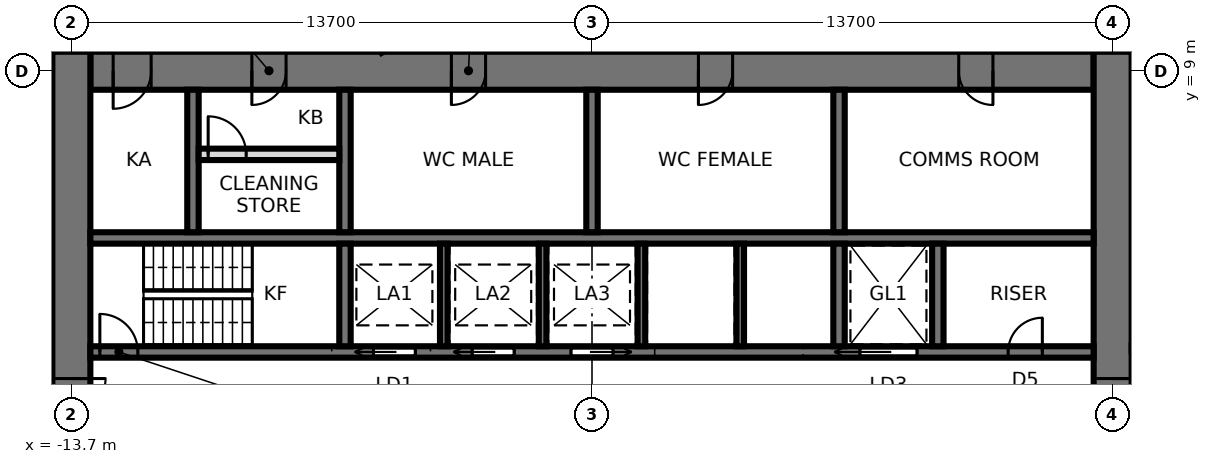
"""IFC4 building model, lengths in metres.
Left out: names, types, materials, properties, quantities, classifications, styles, units other than length and angle.
Written with IfcOpenShell. Run it as: python <this file> out.ifc"""

import sys

from ifc_helpers import new_model, si_unit, direction, frame, frame_2d, origin, place, context, subcontext, project, spatial, rectangle, extrude, element, fill, save


model = new_model("IFC4")
c1 = context("Model", 3, precision=1e-05, world=origin(), true_north=direction((0.0, 1.0)))
c2 = subcontext(c1, "Body", "Model", "MODEL_VIEW")
j1 = project(units=[si_unit("LENGTHUNIT", "METRE"), si_unit("PLANEANGLEUNIT", "RADIAN")], contexts=[c1])
p1 = place(None, origin())
s1 = spatial("IfcSite", under=j1, at=p1, CompositionType="ELEMENT")
p2 = place(p1, origin())
s2 = spatial("IfcBuilding", under=s1, at=p2, CompositionType="ELEMENT")
p3 = place(p2, frame((0.0, 0.0, 23.8)))
s3 = spatial("IfcBuildingStorey", under=s2, at=p3, CompositionType="ELEMENT", Elevation=23.8)
p4 = place(p3, frame((13.2, 9.0, 0.0), z_axis=(0.0, 0.0, 1.0), x_axis=(-1.0, 0.0, 0.0)))
e1 = element("IfcWall", 1, at=p4, inside=s3, PredefinedType="SHEAR", context=c2, shape_type="SweptSolid", body=[
    extrude(rectangle(XDim=26.4, YDim=1.0, at=frame_2d((13.2, 0.0))), origin(), (0.0, 0.0, 1.0), 4.2),
])
p5 = place(p4, frame((2.65, 0.0, 0.0)))
e2 = element("IfcOpeningElement", 2, at=p5, cuts=e1, PredefinedType="OPENING", context=c2, shape_type="SweptSolid", body=[
    extrude(rectangle(XDim=0.9, YDim=2.1, at=frame_2d((0.45, 1.05))), frame((0.0, 0.51, 0.0), z_axis=(0.0, -1.0, 0.0), x_axis=(1.0, 0.0, 0.0)), (0.0, 0.0, 1.0), 1.02),
])
p6 = place(p4, frame((9.5, 0.0, 0.0)))
e3 = element("IfcOpeningElement", 3, at=p6, cuts=e1, PredefinedType="OPENING", context=c2, shape_type="SweptSolid", body=[
    extrude(rectangle(XDim=0.9, YDim=2.1, at=frame_2d((0.45, 1.05))), frame((0.0, 0.51, 0.0), z_axis=(0.0, -1.0, 0.0), x_axis=(1.0, 0.0, 0.0)), (0.0, 0.0, 1.0), 1.02),
])
p7 = place(p4, frame((16.0, 0.0, 0.0)))
e4 = element("IfcOpeningElement", 4, at=p7, cuts=e1, PredefinedType="OPENING", context=c2, shape_type="SweptSolid", body=[
    extrude(rectangle(XDim=0.9, YDim=2.1, at=frame_2d((0.45, 1.05))), frame((0.0, 0.51, 0.0), z_axis=(0.0, -1.0, 0.0), x_axis=(1.0, 0.0, 0.0)), (0.0, 0.0, 1.0), 1.02),
])
p8 = place(p4, frame((21.25, 0.0, 0.0)))
e5 = element("IfcOpeningElement", 5, at=p8, cuts=e1, PredefinedType="OPENING", context=c2, shape_type="SweptSolid", body=[
    extrude(rectangle(XDim=0.9, YDim=2.1, at=frame_2d((0.45, 1.05))), frame((0.0, 0.51, 0.0), z_axis=(0.0, -1.0, 0.0), x_axis=(1.0, 0.0, 0.0)), (0.0, 0.0, 1.0), 1.02),
])
p9 = place(p4, frame((24.8, 0.0, 0.0)))
e6 = element("IfcOpeningElement", 6, at=p9, cuts=e1, PredefinedType="OPENING", context=c2, shape_type="SweptSolid", body=[
    extrude(rectangle(XDim=1.0, YDim=2.1, at=frame_2d((0.5, 1.05))), frame((0.0, 0.51, 0.0), z_axis=(0.0, -1.0, 0.0), x_axis=(1.0, 0.0, 0.0)), (0.0, 0.0, 1.0), 1.02),
])
p10 = place(p3, frame((13.7, -9.5, 0.0), z_axis=(0.0, 0.0, 1.0), x_axis=(0.0, 1.0, 0.0)))
e7 = element("IfcWall", 7, at=p10, inside=s3, PredefinedType="SHEAR", context=c2, shape_type="SweptSolid", body=[
    extrude(rectangle(XDim=19.0, YDim=1.0, at=frame_2d((9.5, 0.0))), origin(), (0.0, 0.0, 1.0), 4.2),
])
p11 = place(p10, frame((8.6, 0.0, 0.0)))
e8 = element("IfcOpeningElement", 8, at=p11, cuts=e7, PredefinedType="OPENING", context=c2, shape_type="SweptSolid", body=[
    extrude(rectangle(XDim=1.8, YDim=2.4, at=frame_2d((0.9, 1.2))), frame((0.0, 0.51, 0.0), z_axis=(0.0, -1.0, 0.0), x_axis=(1.0, 0.0, 0.0)), (0.0, 0.0, 1.0), 1.02),
])
p12 = place(p3, frame((-13.7, 9.5, 0.0), z_axis=(0.0, 0.0, 1.0), x_axis=(0.0, -1.0, 0.0)))
e9 = element("IfcWall", 9, at=p12, inside=s3, PredefinedType="SHEAR", context=c2, shape_type="SweptSolid", body=[
    extrude(rectangle(XDim=19.0, YDim=1.0, at=frame_2d((9.5, 0.0))), origin(), (0.0, 0.0, 1.0), 4.2),
])
p13 = place(p12, frame((8.6, 0.0, 0.0)))
e10 = element("IfcOpeningElement", 10, at=p13, cuts=e9, PredefinedType="OPENING", context=c2, shape_type="SweptSolid", body=[
    extrude(rectangle(XDim=1.8, YDim=2.4, at=frame_2d((0.9, 1.2))), frame((0.0, 0.51, 0.0), z_axis=(0.0, -1.0, 0.0), x_axis=(1.0, 0.0, 0.0)), (0.0, 0.0, 1.0), 1.02),
])
p14 = place(p3, frame((-13.2, 1.6, 0.0), z_axis=(0.0, 0.0, 1.0), x_axis=(1.0, 0.0, 0.0)))
e11 = element("IfcWall", 11, at=p14, inside=s3, PredefinedType="SHEAR", context=c2, shape_type="SweptSolid", body=[
    extrude(rectangle(XDim=26.4, YDim=0.3, at=frame_2d((13.2, 0.0))), origin(), (0.0, 0.0, 1.0), 4.2),
])
p15 = place(p14, frame((0.25, 0.0, 0.0)))
e12 = element("IfcOpeningElement", 12, at=p15, cuts=e11, PredefinedType="OPENING", context=c2, shape_type="SweptSolid", body=[
    extrude(rectangle(XDim=1.0, YDim=2.1, at=frame_2d((0.5, 1.05))), frame((0.0, 0.16, 0.0), z_axis=(0.0, -1.0, 0.0), x_axis=(1.0, 0.0, 0.0)), (0.0, 0.0, 1.0), 0.32),
])
p16 = place(p14, frame((20.25, 0.0, 0.0)))
e13 = element("IfcOpeningElement", 13, at=p16, cuts=e11, PredefinedType="OPENING", context=c2, shape_type="SweptSolid", body=[
    extrude(rectangle(XDim=1.5, YDim=2.4, at=frame_2d((0.75, 1.2))), frame((0.0, 0.16, 0.0), z_axis=(0.0, -1.0, 0.0), x_axis=(1.0, 0.0, 0.0)), (0.0, 0.0, 1.0), 0.32),
])
p17 = place(p14, frame((7.45, 0.0, 0.0)))
e14 = element("IfcOpeningElement", 14, at=p17, cuts=e11, PredefinedType="OPENING", context=c2, shape_type="SweptSolid", body=[
    extrude(rectangle(XDim=1.1, YDim=2.3, at=frame_2d((0.55, 1.15))), frame((0.0, 0.16, 0.0), z_axis=(0.0, -1.0, 0.0), x_axis=(1.0, 0.0, 0.0)), (0.0, 0.0, 1.0), 0.32),
])
p18 = place(p14, frame((10.05, 0.0, 0.0)))
e15 = element("IfcOpeningElement", 15, at=p18, cuts=e11, PredefinedType="OPENING", context=c2, shape_type="SweptSolid", body=[
    extrude(rectangle(XDim=1.1, YDim=2.3, at=frame_2d((0.55, 1.15))), frame((0.0, 0.16, 0.0), z_axis=(0.0, -1.0, 0.0), x_axis=(1.0, 0.0, 0.0)), (0.0, 0.0, 1.0), 0.32),
])
p19 = place(p14, frame((12.65, 0.0, 0.0)))
e16 = element("IfcOpeningElement", 16, at=p19, cuts=e11, PredefinedType="OPENING", context=c2, shape_type="SweptSolid", body=[
    extrude(rectangle(XDim=1.1, YDim=2.3, at=frame_2d((0.55, 1.15))), frame((0.0, 0.16, 0.0), z_axis=(0.0, -1.0, 0.0), x_axis=(1.0, 0.0, 0.0)), (0.0, 0.0, 1.0), 0.32),
])
p20 = place(p14, frame((24.15, 0.0, 0.0)))
e17 = element("IfcOpeningElement", 17, at=p20, cuts=e11, PredefinedType="OPENING", context=c2, shape_type="SweptSolid", body=[
    extrude(rectangle(XDim=0.9, YDim=2.1, at=frame_2d((0.45, 1.05))), frame((0.0, 0.16, 0.0), z_axis=(0.0, -1.0, 0.0), x_axis=(1.0, 0.0, 0.0)), (0.0, 0.0, 1.0), 0.32),
])
p21 = place(p3, frame((-13.2, 4.6, 0.0), z_axis=(0.0, 0.0, 1.0), x_axis=(1.0, 0.0, 0.0)))
e18 = element("IfcWall", 18, at=p21, inside=s3, PredefinedType="SHEAR", context=c2, shape_type="SweptSolid", body=[
    extrude(rectangle(XDim=26.4, YDim=0.3, at=frame_2d((13.2, 0.0))), origin(), (0.0, 0.0, 1.0), 4.2),
])
p22 = place(p3, frame((-6.5, 1.75, 0.0), z_axis=(0.0, 0.0, 1.0), x_axis=(0.0, 1.0, 0.0)))
e19 = element("IfcWall", 19, at=p22, inside=s3, PredefinedType="SHEAR", context=c2, shape_type="SweptSolid", body=[
    extrude(rectangle(XDim=2.7, YDim=0.3, at=frame_2d((1.35, 0.0))), origin(), (0.0, 0.0, 1.0), 4.2),
])
p23 = place(p3, frame((-6.5, 4.75, 0.0), z_axis=(0.0, 0.0, 1.0), x_axis=(0.0, 1.0, 0.0)))
e20 = element("IfcWall", 20, at=p23, inside=s3, PredefinedType="SHEAR", context=c2, shape_type="SweptSolid", body=[
    extrude(rectangle(XDim=3.75, YDim=0.3, at=frame_2d((1.875, 0.0))), origin(), (0.0, 0.0, 1.0), 4.2),
])
p24 = place(p3, frame((6.5, 1.75, 0.0), z_axis=(0.0, 0.0, 1.0), x_axis=(0.0, 1.0, 0.0)))
e21 = element("IfcWall", 21, at=p24, inside=s3, PredefinedType="SHEAR", context=c2, shape_type="SweptSolid", body=[
    extrude(rectangle(XDim=2.7, YDim=0.3, at=frame_2d((1.35, 0.0))), origin(), (0.0, 0.0, 1.0), 4.2),
])
p25 = place(p3, frame((6.5, 4.75, 0.0), z_axis=(0.0, 0.0, 1.0), x_axis=(0.0, 1.0, 0.0)))
e22 = element("IfcWall", 22, at=p25, inside=s3, PredefinedType="SHEAR", context=c2, shape_type="SweptSolid", body=[
    extrude(rectangle(XDim=3.75, YDim=0.3, at=frame_2d((1.875, 0.0))), origin(), (0.0, 0.0, 1.0), 4.2),
])
for number, where, z_axis, x_axis in (
    (23, (-3.9, 1.75, 0.0), (0.0, 0.0, 1.0), (0.0, 1.0, 0.0)),
    (24, (-1.3, 1.75, 0.0), (0.0, 0.0, 1.0), (0.0, 1.0, 0.0)),
    (25, (1.3, 1.75, 0.0), (0.0, 0.0, 1.0), (0.0, 1.0, 0.0)),
    (26, (3.9, 1.75, 0.0), (0.0, 0.0, 1.0), (0.0, 1.0, 0.0)),
):
    element("IfcWall", number, at=place(p3, frame(where, z_axis=z_axis, x_axis=x_axis)), inside=s3, PredefinedType="SHEAR", context=c2, shape_type="SweptSolid", body=[
        extrude(rectangle(XDim=2.7, YDim=0.2, at=frame_2d((1.35, 0.0))), origin(), (0.0, 0.0, 1.0), 4.2),
    ])
for number, where, z_axis, x_axis in (
    (27, (0.0, 4.75, 0.0), (0.0, 0.0, 1.0), (0.0, 1.0, 0.0)),
    (28, (-10.5, 4.75, 0.0), (0.0, 0.0, 1.0), (0.0, 1.0, 0.0)),
):
    element("IfcWall", number, at=place(p3, frame(where, z_axis=z_axis, x_axis=x_axis)), inside=s3, PredefinedType="SHEAR", context=c2, shape_type="SweptSolid", body=[
        extrude(rectangle(XDim=3.75, YDim=0.3, at=frame_2d((1.875, 0.0))), origin(), (0.0, 0.0, 1.0), 4.2),
    ])
p26 = place(p3, frame((9.1, 1.75, 0.0), z_axis=(0.0, 0.0, 1.0), x_axis=(0.0, 1.0, 0.0)))
e29 = element("IfcWall", 29, at=p26, inside=s3, PredefinedType="SHEAR", context=c2, shape_type="SweptSolid", body=[
    extrude(rectangle(XDim=2.7, YDim=0.3, at=frame_2d((1.35, 0.0))), origin(), (0.0, 0.0, 1.0), 4.2),
])
p27 = place(p3, frame((-10.35, 6.8, 0.0), z_axis=(0.0, 0.0, 1.0), x_axis=(1.0, 0.0, 0.0)))
e30 = element("IfcWall", 30, at=p27, inside=s3, PredefinedType="PARTITIONING", context=c2, shape_type="SweptSolid", body=[
    extrude(rectangle(XDim=3.7, YDim=0.3, at=frame_2d((1.85, 0.0))), origin(), (0.0, 0.0, 1.0), 4.04),
])
p28 = place(p27, frame((0.25, 0.0, 0.0)))
e31 = element("IfcOpeningElement", 31, at=p28, cuts=e30, PredefinedType="OPENING", context=c2, shape_type="SweptSolid", body=[
    extrude(rectangle(XDim=1.0, YDim=2.4, at=frame_2d((0.5, 1.2))), frame((0.0, 0.16, 0.0), z_axis=(0.0, -1.0, 0.0), x_axis=(1.0, 0.0, 0.0)), (0.0, 0.0, 1.0), 0.32),
])
p29 = place(p3, frame((18.4, 1.7, 0.0), z_axis=(0.0, 0.0, 1.0), x_axis=(-1.0, 0.0, 0.0)))
e32 = element("IfcWall", 32, at=p29, inside=s3, PredefinedType="PARTITIONING", context=c2, shape_type="SweptSolid", body=[
    extrude(rectangle(XDim=4.2, YDim=0.15, at=frame_2d((2.1, 0.0))), origin(), (0.0, 0.0, 1.0), 4.04),
])
p30 = place(p3, frame((-5.485, 9.5, 0.0), z_axis=(0.0, 0.0, 1.0), x_axis=(-0.499929208183, 0.866066271601, 0.0)))
e33 = element("IfcWall", 33, at=p30, inside=s3, PredefinedType="PARTITIONING", context=c2, shape_type="SweptSolid", body=[
    extrude(rectangle(XDim=2.078, YDim=0.12, at=frame_2d((1.039, 0.0))), origin(), (0.0, 0.0, 1.0), 4.04),
])
p31 = place(p13, origin())
e34 = element("IfcDoor", 34, at=p31, inside=s3, OperationType="DOUBLE_DOOR_SINGLE_SWING", PredefinedType="DOOR", context=c2, shape_type="SweptSolid", body=[
    extrude(rectangle(XDim=1.72, YDim=2.36, at=frame_2d((0.9, 1.18))), frame((0.0, 0.025, 0.0), z_axis=(0.0, -1.0, 0.0), x_axis=(1.0, 0.0, 0.0)), (0.0, 0.0, 1.0), 0.05),
    extrude(rectangle(XDim=0.04, YDim=2.4, at=frame_2d((0.02, 1.2))), frame((0.0, 0.25, 0.0), z_axis=(0.0, -1.0, 0.0), x_axis=(1.0, 0.0, 0.0)), (0.0, 0.0, 1.0), 0.5),
    extrude(rectangle(XDim=0.04, YDim=2.4, at=frame_2d((1.78, 1.2))), frame((0.0, 0.25, 0.0), z_axis=(0.0, -1.0, 0.0), x_axis=(1.0, 0.0, 0.0)), (0.0, 0.0, 1.0), 0.5),
    extrude(rectangle(XDim=1.72, YDim=0.04, at=frame_2d((0.9, 2.38))), frame((0.0, 0.25, 0.0), z_axis=(0.0, -1.0, 0.0), x_axis=(1.0, 0.0, 0.0)), (0.0, 0.0, 1.0), 0.5),
])
fill(e10, e34)
p32 = place(p11, frame((1.8, 0.0, 0.0), z_axis=(0.0, 0.0, 1.0), x_axis=(-1.0, 0.0, 0.0)))
e35 = element("IfcDoor", 35, at=p32, inside=s3, OperationType="DOUBLE_DOOR_SINGLE_SWING", PredefinedType="DOOR", context=c2, shape_type="SweptSolid", body=[
    extrude(rectangle(XDim=1.72, YDim=2.36, at=frame_2d((0.9, 1.18))), frame((0.0, 0.025, 0.0), z_axis=(0.0, -1.0, 0.0), x_axis=(1.0, 0.0, 0.0)), (0.0, 0.0, 1.0), 0.05),
    extrude(rectangle(XDim=0.04, YDim=2.4, at=frame_2d((1.78, 1.2))), frame((0.0, 0.25, 0.0), z_axis=(0.0, -1.0, 0.0), x_axis=(1.0, 0.0, 0.0)), (0.0, 0.0, 1.0), 0.5),
    extrude(rectangle(XDim=0.04, YDim=2.4, at=frame_2d((0.02, 1.2))), frame((0.0, 0.25, 0.0), z_axis=(0.0, -1.0, 0.0), x_axis=(1.0, 0.0, 0.0)), (0.0, 0.0, 1.0), 0.5),
    extrude(rectangle(XDim=1.72, YDim=0.04, at=frame_2d((0.9, 2.38))), frame((0.0, 0.25, 0.0), z_axis=(0.0, -1.0, 0.0), x_axis=(1.0, 0.0, 0.0)), (0.0, 0.0, 1.0), 0.5),
])
fill(e8, e35)
p33 = place(p15, origin())
e36 = element("IfcDoor", 36, at=p33, inside=s3, OperationType="SINGLE_SWING_LEFT", PredefinedType="DOOR", context=c2, shape_type="SweptSolid", body=[
    extrude(rectangle(XDim=1.0, YDim=2.1, at=frame_2d((0.5, 1.05))), frame((0.0, 0.025, 0.0), z_axis=(0.0, -1.0, 0.0), x_axis=(1.0, 0.0, 0.0)), (0.0, 0.0, 1.0), 0.05),
])
fill(e12, e36)
p34 = place(p16, origin())
e37 = element("IfcDoor", 37, at=p34, inside=s3, OperationType="SLIDING_TO_LEFT", PredefinedType="DOOR", context=c2, shape_type="SweptSolid", body=[
    extrude(rectangle(XDim=1.5, YDim=2.4, at=frame_2d((0.75, 1.2))), frame((0.0, 0.025, 0.0), z_axis=(0.0, -1.0, 0.0), x_axis=(1.0, 0.0, 0.0)), (0.0, 0.0, 1.0), 0.05),
])
fill(e13, e37)
p35 = place(p17, origin())
e38 = element("IfcDoor", 38, at=p35, inside=s3, OperationType="SLIDING_TO_LEFT", PredefinedType="DOOR", context=c2, shape_type="SweptSolid", body=[
    extrude(rectangle(XDim=1.1, YDim=2.3, at=frame_2d((0.55, 1.15))), frame((0.0, 0.025, 0.0), z_axis=(0.0, -1.0, 0.0), x_axis=(1.0, 0.0, 0.0)), (0.0, 0.0, 1.0), 0.05),
])
fill(e14, e38)
p36 = place(p18, origin())
e39 = element("IfcDoor", 39, at=p36, inside=s3, OperationType="SLIDING_TO_LEFT", PredefinedType="DOOR", context=c2, shape_type="SweptSolid", body=[
    extrude(rectangle(XDim=1.1, YDim=2.3, at=frame_2d((0.55, 1.15))), frame((0.0, 0.025, 0.0), z_axis=(0.0, -1.0, 0.0), x_axis=(1.0, 0.0, 0.0)), (0.0, 0.0, 1.0), 0.05),
])
fill(e15, e39)
p37 = place(p19, origin())
e40 = element("IfcDoor", 40, at=p37, inside=s3, OperationType="SLIDING_TO_RIGHT", PredefinedType="DOOR", context=c2, shape_type="SweptSolid", body=[
    extrude(rectangle(XDim=1.1, YDim=2.3, at=frame_2d((0.55, 1.15))), frame((0.0, 0.025, 0.0), z_axis=(0.0, -1.0, 0.0), x_axis=(1.0, 0.0, 0.0)), (0.0, 0.0, 1.0), 0.05),
])
fill(e16, e40)
p38 = place(p20, origin())
e41 = element("IfcDoor", 41, at=p38, inside=s3, OperationType="SINGLE_SWING_RIGHT", PredefinedType="DOOR", context=c2, shape_type="SweptSolid", body=[
    extrude(rectangle(XDim=0.9, YDim=2.1, at=frame_2d((0.45, 1.05))), frame((0.0, 0.025, 0.0), z_axis=(0.0, -1.0, 0.0), x_axis=(1.0, 0.0, 0.0)), (0.0, 0.0, 1.0), 0.05),
])
fill(e17, e41)
p39 = place(p5, origin())
e42 = element("IfcDoor", 42, at=p39, inside=s3, OperationType="SINGLE_SWING_LEFT", PredefinedType="DOOR", context=c2, shape_type="SweptSolid", body=[
    extrude(rectangle(XDim=0.82, YDim=2.06, at=frame_2d((0.45, 1.03))), frame((0.0, 0.025, 0.0), z_axis=(0.0, -1.0, 0.0), x_axis=(1.0, 0.0, 0.0)), (0.0, 0.0, 1.0), 0.05),
    extrude(rectangle(XDim=0.04, YDim=2.1, at=frame_2d((0.02, 1.05))), frame((0.0, 0.25, 0.0), z_axis=(0.0, -1.0, 0.0), x_axis=(1.0, 0.0, 0.0)), (0.0, 0.0, 1.0), 0.5),
    extrude(rectangle(XDim=0.04, YDim=2.1, at=frame_2d((0.88, 1.05))), frame((0.0, 0.25, 0.0), z_axis=(0.0, -1.0, 0.0), x_axis=(1.0, 0.0, 0.0)), (0.0, 0.0, 1.0), 0.5),
    extrude(rectangle(XDim=0.82, YDim=0.04, at=frame_2d((0.45, 2.08))), frame((0.0, 0.25, 0.0), z_axis=(0.0, -1.0, 0.0), x_axis=(1.0, 0.0, 0.0)), (0.0, 0.0, 1.0), 0.5),
])
fill(e2, e42)
p40 = place(p6, origin())
e43 = element("IfcDoor", 43, at=p40, inside=s3, OperationType="SINGLE_SWING_RIGHT", PredefinedType="DOOR", context=c2, shape_type="SweptSolid", body=[
    extrude(rectangle(XDim=0.82, YDim=2.06, at=frame_2d((0.45, 1.03))), frame((0.0, 0.025, 0.0), z_axis=(0.0, -1.0, 0.0), x_axis=(1.0, 0.0, 0.0)), (0.0, 0.0, 1.0), 0.05),
    extrude(rectangle(XDim=0.04, YDim=2.1, at=frame_2d((0.02, 1.05))), frame((0.0, 0.25, 0.0), z_axis=(0.0, -1.0, 0.0), x_axis=(1.0, 0.0, 0.0)), (0.0, 0.0, 1.0), 0.5),
    extrude(rectangle(XDim=0.04, YDim=2.1, at=frame_2d((0.88, 1.05))), frame((0.0, 0.25, 0.0), z_axis=(0.0, -1.0, 0.0), x_axis=(1.0, 0.0, 0.0)), (0.0, 0.0, 1.0), 0.5),
    extrude(rectangle(XDim=0.82, YDim=0.04, at=frame_2d((0.45, 2.08))), frame((0.0, 0.25, 0.0), z_axis=(0.0, -1.0, 0.0), x_axis=(1.0, 0.0, 0.0)), (0.0, 0.0, 1.0), 0.5),
])
fill(e3, e43)
p41 = place(p7, origin())
e44 = element("IfcDoor", 44, at=p41, inside=s3, OperationType="SINGLE_SWING_RIGHT", PredefinedType="DOOR", context=c2, shape_type="SweptSolid", body=[
    extrude(rectangle(XDim=0.82, YDim=2.06, at=frame_2d((0.45, 1.03))), frame((0.0, 0.025, 0.0), z_axis=(0.0, -1.0, 0.0), x_axis=(1.0, 0.0, 0.0)), (0.0, 0.0, 1.0), 0.05),
    extrude(rectangle(XDim=0.04, YDim=2.1, at=frame_2d((0.02, 1.05))), frame((0.0, 0.25, 0.0), z_axis=(0.0, -1.0, 0.0), x_axis=(1.0, 0.0, 0.0)), (0.0, 0.0, 1.0), 0.5),
    extrude(rectangle(XDim=0.04, YDim=2.1, at=frame_2d((0.88, 1.05))), frame((0.0, 0.25, 0.0), z_axis=(0.0, -1.0, 0.0), x_axis=(1.0, 0.0, 0.0)), (0.0, 0.0, 1.0), 0.5),
    extrude(rectangle(XDim=0.82, YDim=0.04, at=frame_2d((0.45, 2.08))), frame((0.0, 0.25, 0.0), z_axis=(0.0, -1.0, 0.0), x_axis=(1.0, 0.0, 0.0)), (0.0, 0.0, 1.0), 0.5),
])
fill(e4, e44)
p42 = place(p8, origin())
e45 = element("IfcDoor", 45, at=p42, inside=s3, OperationType="SINGLE_SWING_RIGHT", PredefinedType="DOOR", context=c2, shape_type="SweptSolid", body=[
    extrude(rectangle(XDim=0.82, YDim=2.06, at=frame_2d((0.45, 1.03))), frame((0.0, 0.025, 0.0), z_axis=(0.0, -1.0, 0.0), x_axis=(1.0, 0.0, 0.0)), (0.0, 0.0, 1.0), 0.05),
    extrude(rectangle(XDim=0.04, YDim=2.1, at=frame_2d((0.02, 1.05))), frame((0.0, 0.25, 0.0), z_axis=(0.0, -1.0, 0.0), x_axis=(1.0, 0.0, 0.0)), (0.0, 0.0, 1.0), 0.5),
    extrude(rectangle(XDim=0.04, YDim=2.1, at=frame_2d((0.88, 1.05))), frame((0.0, 0.25, 0.0), z_axis=(0.0, -1.0, 0.0), x_axis=(1.0, 0.0, 0.0)), (0.0, 0.0, 1.0), 0.5),
    extrude(rectangle(XDim=0.82, YDim=0.04, at=frame_2d((0.45, 2.08))), frame((0.0, 0.25, 0.0), z_axis=(0.0, -1.0, 0.0), x_axis=(1.0, 0.0, 0.0)), (0.0, 0.0, 1.0), 0.5),
])
fill(e5, e45)
p43 = place(p9, origin())
e46 = element("IfcDoor", 46, at=p43, inside=s3, OperationType="SINGLE_SWING_RIGHT", PredefinedType="DOOR", context=c2, shape_type="SweptSolid", body=[
    extrude(rectangle(XDim=0.92, YDim=2.06, at=frame_2d((0.5, 1.03))), frame((0.0, 0.025, 0.0), z_axis=(0.0, -1.0, 0.0), x_axis=(1.0, 0.0, 0.0)), (0.0, 0.0, 1.0), 0.05),
    extrude(rectangle(XDim=0.04, YDim=2.1, at=frame_2d((0.02, 1.05))), frame((0.0, 0.25, 0.0), z_axis=(0.0, -1.0, 0.0), x_axis=(1.0, 0.0, 0.0)), (0.0, 0.0, 1.0), 0.5),
    extrude(rectangle(XDim=0.04, YDim=2.1, at=frame_2d((0.98, 1.05))), frame((0.0, 0.25, 0.0), z_axis=(0.0, -1.0, 0.0), x_axis=(1.0, 0.0, 0.0)), (0.0, 0.0, 1.0), 0.5),
    extrude(rectangle(XDim=0.92, YDim=0.04, at=frame_2d((0.5, 2.08))), frame((0.0, 0.25, 0.0), z_axis=(0.0, -1.0, 0.0), x_axis=(1.0, 0.0, 0.0)), (0.0, 0.0, 1.0), 0.5),
])
fill(e6, e46)
p44 = place(p28, origin())
e47 = element("IfcDoor", 47, at=p44, inside=s3, OperationType="SINGLE_SWING_LEFT", PredefinedType="DOOR", context=c2, shape_type="SweptSolid", body=[
    extrude(rectangle(XDim=1.0, YDim=2.4, at=frame_2d((0.5, 1.2))), frame((0.0, 0.025, 0.0), z_axis=(0.0, -1.0, 0.0), x_axis=(1.0, 0.0, 0.0)), (0.0, 0.0, 1.0), 0.05),
])
fill(e31, e47)
save(model, sys.argv[1])
